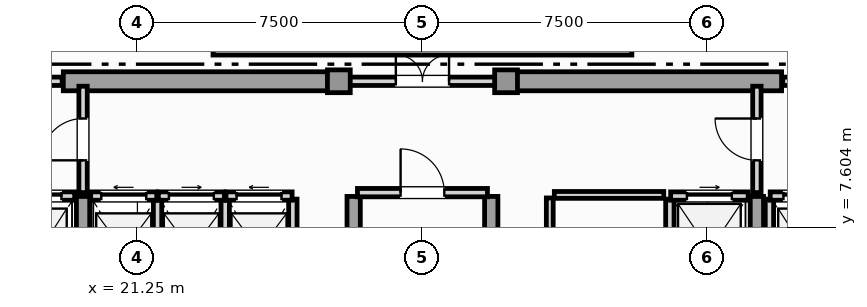
"""IFC4 building model, lengths in metres.
Left out: names, types, materials, properties, quantities, classifications, styles, units other than length and angle.
Written with IfcOpenShell. Run it as: python <this file> out.ifc"""

import sys

from ifc_helpers import new_model, si_unit, direction, frame, frame_2d, origin, origin_2d, place, context, subcontext, project, spatial, rectangle, extrude, element, fill, save


model = new_model("IFC4")
c1 = context("Model", 3, precision=1e-05, world=origin(), true_north=direction((0.0, 1.0)))
c2 = subcontext(c1, "Body", "Model", "MODEL_VIEW")
j1 = project(units=[si_unit("LENGTHUNIT", "METRE"), si_unit("PLANEANGLEUNIT", "RADIAN")], contexts=[c1])
p1 = place(None, origin())
s1 = spatial("IfcSite", under=j1, at=p1, CompositionType="ELEMENT")
p2 = place(p1, origin())
s2 = spatial("IfcBuilding", under=s1, at=p2, CompositionType="ELEMENT")
p3 = place(p2, frame((0.0, 0.0, 345.2)))
s3 = spatial("IfcBuildingStorey", under=s2, at=p3, CompositionType="ELEMENT", Elevation=345.2)
for number, where, z_axis, x_axis in (
    (1, (19.3, 11.45, 0.0), (0.0, 0.0, 1.0), (1.0, 0.0, 0.0)),
    (2, (30.9, 11.45, 0.0), (0.0, 0.0, 1.0), (1.0, 0.0, 0.0)),
):
    element("IfcWall", number, at=place(p3, frame(where, z_axis=z_axis, x_axis=x_axis)), inside=s3, PredefinedType="SHEAR", context=c2, shape_type="SweptSolid", body=[
        extrude(rectangle(XDim=7.3, YDim=0.5, at=frame_2d((3.65, 0.0))), origin(), (0.0, 0.0, 1.0), 3.59),
    ])
for number, where, z_axis, x_axis in (
    (3, (19.82, 0.92, 0.0), (0.0, 0.0, 1.0), (0.0, 1.0, 0.0)),
    (4, (26.94, 0.92, 0.0), (0.0, 0.0, 1.0), (0.0, 1.0, 0.0)),
    (5, (30.56, 0.92, 0.0), (0.0, 0.0, 1.0), (0.0, 1.0, 0.0)),
    (6, (37.55, 0.92, 0.0), (0.0, 0.0, 1.0), (0.0, 1.0, 0.0)),
):
    element("IfcWall", number, at=place(p3, frame(where, z_axis=z_axis, x_axis=x_axis)), inside=s3, PredefinedType="SHEAR", context=c2, shape_type="SweptSolid", body=[
        extrude(rectangle(XDim=7.5, YDim=0.35, at=frame_2d((3.75, 0.0))), origin(), (0.0, 0.0, 1.0), 3.59),
    ])
for number, where, z_axis, x_axis in (
    (7, (26.55, 11.45, 0.0), (0.0, 0.0, 1.0), (1.0, 0.0, 0.0)),
    (8, (30.95, 11.45, 0.0), (0.0, 0.0, 1.0), (1.0, 0.0, 0.0)),
):
    element("IfcColumn", number, at=place(p3, frame(where, z_axis=z_axis, x_axis=x_axis)), inside=s3, PredefinedType="COLUMN", context=c2, shape_type="SweptSolid", body=[
        extrude(rectangle(XDim=0.6, YDim=0.6, at=origin_2d()), origin(), (0.0, 0.0, 1.0), 3.85),
    ])
p4 = place(p3, frame((34.26, 12.27, 0.0), z_axis=(0.0, 0.0, 1.0), x_axis=(-1.0, 0.0, 0.0)))
e9 = element("IfcWall", 9, at=p4, inside=s3, PredefinedType="SOLIDWALL", context=c2, shape_type="SweptSolid", body=[
    extrude(rectangle(XDim=11.02, YDim=0.26, at=frame_2d((5.51, 0.0))), origin(), (0.0, 0.0, 1.0), 3.59),
])
p5 = place(p3, frame((17.78, 8.43, 0.0), z_axis=(0.0, 0.0, 1.0), x_axis=(1.0, 0.0, 0.0)))
e10 = element("IfcWall", 10, at=p5, inside=s3, PredefinedType="SOLIDWALL", context=c2, shape_type="SweptSolid", body=[
    extrude(rectangle(XDim=1.82, YDim=0.22, at=frame_2d((0.91, 0.0))), origin(), (0.0, 0.0, 1.0), 3.59),
])
p6 = place(p5, frame((0.35, 0.0, 0.0)))
e11 = element("IfcOpeningElement", 11, at=p6, cuts=e10, PredefinedType="OPENING", context=c2, shape_type="SweptSolid", body=[
    extrude(rectangle(XDim=1.12, YDim=2.25, at=frame_2d((0.56, 1.125))), frame((0.0, 0.12, 0.0), z_axis=(0.0, -1.0, 0.0), x_axis=(1.0, 0.0, 0.0)), (0.0, 0.0, 1.0), 0.24),
])
p7 = place(p3, frame((37.88, 5.65, 0.0), z_axis=(0.0, 0.0, 1.0), x_axis=(0.0, 1.0, 0.0)))
e12 = element("IfcWall", 12, at=p7, inside=s3, PredefinedType="SOLIDWALL", context=c2, shape_type="SweptSolid", body=[
    extrude(rectangle(XDim=2.7, YDim=0.22, at=frame_2d((1.35, 0.0))), origin(), (0.0, 0.0, 1.0), 3.59),
])
p8 = place(p3, frame((37.9, 8.43, 0.0), z_axis=(0.0, 0.0, 1.0), x_axis=(1.0, 0.0, 0.0)))
e13 = element("IfcWall", 13, at=p8, inside=s3, PredefinedType="SOLIDWALL", context=c2, shape_type="SweptSolid", body=[
    extrude(rectangle(XDim=1.82, YDim=0.22, at=frame_2d((0.91, 0.0))), origin(), (0.0, 0.0, 1.0), 3.59),
])
p9 = place(p8, frame((0.35, 0.0, 0.0)))
e14 = element("IfcOpeningElement", 14, at=p9, cuts=e13, PredefinedType="OPENING", context=c2, shape_type="SweptSolid", body=[
    extrude(rectangle(XDim=1.12, YDim=2.25, at=frame_2d((0.56, 1.125))), frame((0.0, 0.12, 0.0), z_axis=(0.0, -1.0, 0.0), x_axis=(1.0, 0.0, 0.0)), (0.0, 0.0, 1.0), 0.24),
])
p10 = place(p3, frame((35.26, 5.65, 0.0), z_axis=(0.0, 0.0, 1.0), x_axis=(0.0, 1.0, 0.0)))
e15 = element("IfcWall", 15, at=p10, inside=s3, PredefinedType="SOLIDWALL", context=c2, shape_type="SweptSolid", body=[
    extrude(rectangle(XDim=2.7, YDim=0.22, at=frame_2d((1.35, 0.0))), origin(), (0.0, 0.0, 1.0), 3.59),
])
p11 = place(p3, frame((35.28, 8.43, 0.0), z_axis=(0.0, 0.0, 1.0), x_axis=(1.0, 0.0, 0.0)))
e16 = element("IfcWall", 16, at=p11, inside=s3, PredefinedType="SOLIDWALL", context=c2, shape_type="SweptSolid", body=[
    extrude(rectangle(XDim=2.04, YDim=0.22, at=frame_2d((1.02, 0.0))), origin(), (0.0, 0.0, 1.0), 3.59),
])
p12 = place(p11, frame((0.43, 0.0, 0.0)))
e17 = element("IfcOpeningElement", 17, at=p12, cuts=e16, PredefinedType="OPENING", context=c2, shape_type="SweptSolid", body=[
    extrude(rectangle(XDim=1.18, YDim=2.2, at=frame_2d((0.59, 1.1))), frame((0.0, 0.12, 0.0), z_axis=(0.0, -1.0, 0.0), x_axis=(1.0, 0.0, 0.0)), (0.0, 0.0, 1.0), 0.24),
])
p13 = place(p3, frame((21.78, 5.65, 0.0), z_axis=(0.0, 0.0, 1.0), x_axis=(0.0, 1.0, 0.0)))
e18 = element("IfcWall", 18, at=p13, inside=s3, PredefinedType="SOLIDWALL", context=c2, shape_type="SweptSolid", body=[
    extrude(rectangle(XDim=2.7, YDim=0.22, at=frame_2d((1.35, 0.0))), origin(), (0.0, 0.0, 1.0), 3.59),
])
p14 = place(p3, frame((20.02, 8.43, 0.0), z_axis=(0.0, 0.0, 1.0), x_axis=(1.0, 0.0, 0.0)))
e19 = element("IfcWall", 19, at=p14, inside=s3, PredefinedType="SOLIDWALL", context=c2, shape_type="SweptSolid", body=[
    extrude(rectangle(XDim=1.74, YDim=0.22, at=frame_2d((0.87, 0.0))), origin(), (0.0, 0.0, 1.0), 3.59),
])
p15 = place(p14, frame((0.28, 0.0, 0.0)))
e20 = element("IfcOpeningElement", 20, at=p15, cuts=e19, PredefinedType="OPENING", context=c2, shape_type="SweptSolid", body=[
    extrude(rectangle(XDim=1.18, YDim=2.2, at=frame_2d((0.59, 1.1))), frame((0.0, 0.12, 0.0), z_axis=(0.0, -1.0, 0.0), x_axis=(1.0, 0.0, 0.0)), (0.0, 0.0, 1.0), 0.24),
])
p16 = place(p3, frame((23.56, 5.65, 0.0), z_axis=(0.0, 0.0, 1.0), x_axis=(0.0, 1.0, 0.0)))
e21 = element("IfcWall", 21, at=p16, inside=s3, PredefinedType="SOLIDWALL", context=c2, shape_type="SweptSolid", body=[
    extrude(rectangle(XDim=2.7, YDim=0.22, at=frame_2d((1.35, 0.0))), origin(), (0.0, 0.0, 1.0), 3.59),
])
p17 = place(p3, frame((21.8, 8.43, 0.0), z_axis=(0.0, 0.0, 1.0), x_axis=(1.0, 0.0, 0.0)))
e22 = element("IfcWall", 22, at=p17, inside=s3, PredefinedType="SOLIDWALL", context=c2, shape_type="SweptSolid", body=[
    extrude(rectangle(XDim=1.74, YDim=0.22, at=frame_2d((0.87, 0.0))), origin(), (0.0, 0.0, 1.0), 3.59),
])
p18 = place(p17, frame((0.28, 0.0, 0.0)))
e23 = element("IfcOpeningElement", 23, at=p18, cuts=e22, PredefinedType="OPENING", context=c2, shape_type="SweptSolid", body=[
    extrude(rectangle(XDim=1.18, YDim=2.2, at=frame_2d((0.59, 1.1))), frame((0.0, 0.12, 0.0), z_axis=(0.0, -1.0, 0.0), x_axis=(1.0, 0.0, 0.0)), (0.0, 0.0, 1.0), 0.24),
])
p19 = place(p3, frame((25.34, 5.65, 0.0), z_axis=(0.0, 0.0, 1.0), x_axis=(0.0, 1.0, 0.0)))
e24 = element("IfcWall", 24, at=p19, inside=s3, PredefinedType="SOLIDWALL", context=c2, shape_type="SweptSolid", body=[
    extrude(rectangle(XDim=2.7, YDim=0.22, at=frame_2d((1.35, 0.0))), origin(), (0.0, 0.0, 1.0), 3.59),
])
p20 = place(p3, frame((23.58, 8.43, 0.0), z_axis=(0.0, 0.0, 1.0), x_axis=(1.0, 0.0, 0.0)))
e25 = element("IfcWall", 25, at=p20, inside=s3, PredefinedType="SOLIDWALL", context=c2, shape_type="SweptSolid", body=[
    extrude(rectangle(XDim=1.74, YDim=0.22, at=frame_2d((0.87, 0.0))), origin(), (0.0, 0.0, 1.0), 3.59),
])
p21 = place(p20, frame((0.28, 0.0, 0.0)))
e26 = element("IfcOpeningElement", 26, at=p21, cuts=e25, PredefinedType="OPENING", context=c2, shape_type="SweptSolid", body=[
    extrude(rectangle(XDim=1.18, YDim=2.2, at=frame_2d((0.59, 1.1))), frame((0.0, 0.12, 0.0), z_axis=(0.0, -1.0, 0.0), x_axis=(1.0, 0.0, 0.0)), (0.0, 0.0, 1.0), 0.24),
])
p22 = place(p3, frame((27.04, 8.52, 0.0), z_axis=(0.0, 0.0, 1.0), x_axis=(1.0, 0.0, 0.0)))
e27 = element("IfcWall", 27, at=p22, inside=s3, PredefinedType="SOLIDWALL", context=c2, shape_type="SweptSolid", body=[
    extrude(rectangle(XDim=3.42, YDim=0.22, at=frame_2d((1.71, 0.0))), origin(), (0.0, 0.0, 1.0), 3.59),
])
p23 = place(p22, frame((1.135, 0.0, 0.0)))
e28 = element("IfcOpeningElement", 28, at=p23, cuts=e27, PredefinedType="OPENING", context=c2, shape_type="SweptSolid", body=[
    extrude(rectangle(XDim=1.15, YDim=2.2, at=frame_2d((0.575, 1.1))), frame((0.0, 0.12, 0.0), z_axis=(0.0, -1.0, 0.0), x_axis=(1.0, 0.0, 0.0)), (0.0, 0.0, 1.0), 0.24),
])
p24 = place(p3, frame((19.82, 8.52, 0.0), z_axis=(0.0, 0.0, 1.0), x_axis=(0.0, 1.0, 0.0)))
e29 = element("IfcWall", 29, at=p24, inside=s3, PredefinedType="SOLIDWALL", context=c2, shape_type="SweptSolid", body=[
    extrude(rectangle(XDim=2.8, YDim=0.22, at=frame_2d((1.4, 0.0))), origin(), (0.0, 0.0, 1.0), 3.046),
])
p25 = place(p24, frame((0.85, 0.0, 0.0)))
e30 = element("IfcOpeningElement", 30, at=p25, cuts=e29, PredefinedType="OPENING", context=c2, shape_type="SweptSolid", body=[
    extrude(rectangle(XDim=1.1, YDim=2.2, at=frame_2d((0.55, 1.1))), frame((0.0, 0.12, 0.0), z_axis=(0.0, -1.0, 0.0), x_axis=(1.0, 0.0, 0.0)), (0.0, 0.0, 1.0), 0.24),
])
p26 = place(p3, frame((37.55, 8.52, 0.0), z_axis=(0.0, 0.0, 1.0), x_axis=(0.0, 1.0, 0.0)))
e31 = element("IfcWall", 31, at=p26, inside=s3, PredefinedType="SOLIDWALL", context=c2, shape_type="SweptSolid", body=[
    extrude(rectangle(XDim=2.8, YDim=0.22, at=frame_2d((1.4, 0.0))), origin(), (0.0, 0.0, 1.0), 3.046),
])
p27 = place(p26, frame((0.85, 0.0, 0.0)))
e32 = element("IfcOpeningElement", 32, at=p27, cuts=e31, PredefinedType="OPENING", context=c2, shape_type="SweptSolid", body=[
    extrude(rectangle(XDim=1.1, YDim=2.2, at=frame_2d((0.55, 1.1))), frame((0.0, 0.12, 0.0), z_axis=(0.0, -1.0, 0.0), x_axis=(1.0, 0.0, 0.0)), (0.0, 0.0, 1.0), 0.24),
])
p28 = place(p3, frame((16.23, 11.45, 0.0), z_axis=(0.0, 0.0, 1.0), x_axis=(1.0, 0.0, 0.0)))
e33 = element("IfcWall", 33, at=p28, inside=s3, PredefinedType="SOLIDWALL", context=c2, shape_type="SweptSolid", body=[
    extrude(rectangle(XDim=3.04, YDim=0.22, at=frame_2d((1.52, 0.0))), origin(), (0.0, 0.0, 1.0), 3.59),
])
p29 = place(p28, frame((0.97, 0.0, 0.0)))
e34 = element("IfcOpeningElement", 34, at=p29, cuts=e33, PredefinedType="OPENING", context=c2, shape_type="SweptSolid", body=[
    extrude(rectangle(XDim=1.1, YDim=2.2, at=frame_2d((0.55, 1.1))), frame((0.0, 0.12, 0.0), z_axis=(0.0, -1.0, 0.0), x_axis=(1.0, 0.0, 0.0)), (0.0, 0.0, 1.0), 0.24),
])
p30 = place(p3, frame((26.63, 11.45, 0.0), z_axis=(0.0, 0.0, 1.0), x_axis=(1.0, 0.0, 0.0)))
e35 = element("IfcWall", 35, at=p30, inside=s3, PredefinedType="SOLIDWALL", context=c2, shape_type="SweptSolid", body=[
    extrude(rectangle(XDim=4.24, YDim=0.22, at=frame_2d((2.12, 0.0))), origin(), (0.0, 0.0, 1.0), 3.59),
])
p31 = place(p30, frame((1.42, 0.0, 0.0)))
e36 = element("IfcOpeningElement", 36, at=p31, cuts=e35, PredefinedType="OPENING", context=c2, shape_type="SweptSolid", body=[
    extrude(rectangle(XDim=1.4, YDim=2.2, at=frame_2d((0.7, 1.1))), frame((0.0, 0.12, 0.0), z_axis=(0.0, -1.0, 0.0), x_axis=(1.0, 0.0, 0.0)), (0.0, 0.0, 1.0), 0.24),
])
p32 = place(p3, frame((38.23, 11.45, 0.0), z_axis=(0.0, 0.0, 1.0), x_axis=(1.0, 0.0, 0.0)))
e37 = element("IfcWall", 37, at=p32, inside=s3, PredefinedType="SOLIDWALL", context=c2, shape_type="SweptSolid", body=[
    extrude(rectangle(XDim=3.04, YDim=0.22, at=frame_2d((1.52, 0.0))), origin(), (0.0, 0.0, 1.0), 3.59),
])
p33 = place(p32, frame((0.97, 0.0, 0.0)))
e38 = element("IfcOpeningElement", 38, at=p33, cuts=e37, PredefinedType="OPENING", context=c2, shape_type="SweptSolid", body=[
    extrude(rectangle(XDim=1.1, YDim=2.2, at=frame_2d((0.55, 1.1))), frame((0.0, 0.12, 0.0), z_axis=(0.0, -1.0, 0.0), x_axis=(1.0, 0.0, 0.0)), (0.0, 0.0, 1.0), 0.24),
])
p34 = place(p3, frame((32.1, 5.65, 0.0), z_axis=(0.0, 0.0, 1.0), x_axis=(0.0, 1.0, 0.0)))
e39 = element("IfcWall", 39, at=p34, inside=s3, PredefinedType="PARTITIONING", context=c2, shape_type="SweptSolid", body=[
    extrude(rectangle(XDim=2.73, YDim=0.18, at=frame_2d((1.365, 0.0))), origin(), (0.0, 0.0, 1.0), 3.59),
])
p35 = place(p34, frame((0.84, 0.0, 0.0)))
e40 = element("IfcOpeningElement", 40, at=p35, cuts=e39, PredefinedType="OPENING", context=c2, shape_type="SweptSolid", body=[
    extrude(rectangle(XDim=1.05, YDim=2.15, at=frame_2d((0.525, 1.075))), frame((0.0, 0.1, 0.0), z_axis=(0.0, -1.0, 0.0), x_axis=(1.0, 0.0, 0.0)), (0.0, 0.0, 1.0), 0.2),
])
p36 = place(p3, frame((32.22, 8.46, 0.0), z_axis=(0.0, 0.0, 1.0), x_axis=(1.0, 0.0, 0.0)))
e41 = element("IfcWall", 41, at=p36, inside=s3, PredefinedType="PARTITIONING", context=c2, shape_type="SweptSolid", body=[
    extrude(rectangle(XDim=2.88, YDim=0.18, at=frame_2d((1.44, 0.0))), origin(), (0.0, 0.0, 1.0), 3.59),
])
p37 = place(p6, origin())
e42 = element("IfcDoor", 42, at=p37, inside=s3, OperationType="SLIDING_TO_RIGHT", PredefinedType="DOOR", context=c2, shape_type="SweptSolid", body=[
    extrude(rectangle(XDim=1.12, YDim=2.25, at=frame_2d((0.56, 1.125))), frame((0.0, 0.025, 0.0), z_axis=(0.0, -1.0, 0.0), x_axis=(1.0, 0.0, 0.0)), (0.0, 0.0, 1.0), 0.05),
])
fill(e11, e42)
p38 = place(p9, origin())
e43 = element("IfcDoor", 43, at=p38, inside=s3, OperationType="SLIDING_TO_LEFT", PredefinedType="DOOR", context=c2, shape_type="SweptSolid", body=[
    extrude(rectangle(XDim=1.12, YDim=2.25, at=frame_2d((0.56, 1.125))), frame((0.0, 0.025, 0.0), z_axis=(0.0, -1.0, 0.0), x_axis=(1.0, 0.0, 0.0)), (0.0, 0.0, 1.0), 0.05),
])
fill(e14, e43)
p39 = place(p12, origin())
e44 = element("IfcDoor", 44, at=p39, inside=s3, OperationType="SLIDING_TO_RIGHT", PredefinedType="DOOR", context=c2, shape_type="SweptSolid", body=[
    extrude(rectangle(XDim=1.18, YDim=2.2, at=frame_2d((0.59, 1.1))), frame((0.0, 0.025, 0.0), z_axis=(0.0, -1.0, 0.0), x_axis=(1.0, 0.0, 0.0)), (0.0, 0.0, 1.0), 0.05),
])
fill(e17, e44)
p40 = place(p15, origin())
e45 = element("IfcDoor", 45, at=p40, inside=s3, OperationType="SLIDING_TO_LEFT", PredefinedType="DOOR", context=c2, shape_type="SweptSolid", body=[
    extrude(rectangle(XDim=1.18, YDim=2.2, at=frame_2d((0.59, 1.1))), frame((0.0, 0.025, 0.0), z_axis=(0.0, -1.0, 0.0), x_axis=(1.0, 0.0, 0.0)), (0.0, 0.0, 1.0), 0.05),
])
fill(e20, e45)
p41 = place(p18, origin())
e46 = element("IfcDoor", 46, at=p41, inside=s3, OperationType="SLIDING_TO_RIGHT", PredefinedType="DOOR", context=c2, shape_type="SweptSolid", body=[
    extrude(rectangle(XDim=1.18, YDim=2.2, at=frame_2d((0.59, 1.1))), frame((0.0, 0.025, 0.0), z_axis=(0.0, -1.0, 0.0), x_axis=(1.0, 0.0, 0.0)), (0.0, 0.0, 1.0), 0.05),
])
fill(e23, e46)
p42 = place(p21, origin())
e47 = element("IfcDoor", 47, at=p42, inside=s3, OperationType="SLIDING_TO_LEFT", PredefinedType="DOOR", context=c2, shape_type="SweptSolid", body=[
    extrude(rectangle(XDim=1.18, YDim=2.2, at=frame_2d((0.59, 1.1))), frame((0.0, 0.025, 0.0), z_axis=(0.0, -1.0, 0.0), x_axis=(1.0, 0.0, 0.0)), (0.0, 0.0, 1.0), 0.05),
])
fill(e26, e47)
p43 = place(p23, origin())
e48 = element("IfcDoor", 48, at=p43, inside=s3, OperationType="SINGLE_SWING_LEFT", PredefinedType="DOOR", context=c2, shape_type="SweptSolid", body=[
    extrude(rectangle(XDim=1.15, YDim=2.2, at=frame_2d((0.575, 1.1))), frame((0.0, 0.025, 0.0), z_axis=(0.0, -1.0, 0.0), x_axis=(1.0, 0.0, 0.0)), (0.0, 0.0, 1.0), 0.05),
])
fill(e28, e48)
p44 = place(p25, origin())
e49 = element("IfcDoor", 49, at=p44, inside=s3, OperationType="SINGLE_SWING_LEFT", PredefinedType="DOOR", context=c2, shape_type="SweptSolid", body=[
    extrude(rectangle(XDim=1.1, YDim=2.2, at=frame_2d((0.55, 1.1))), frame((0.0, 0.025, 0.0), z_axis=(0.0, -1.0, 0.0), x_axis=(1.0, 0.0, 0.0)), (0.0, 0.0, 1.0), 0.05),
])
fill(e30, e49)
p45 = place(p27, origin())
e50 = element("IfcDoor", 50, at=p45, inside=s3, OperationType="SINGLE_SWING_RIGHT", PredefinedType="DOOR", context=c2, shape_type="SweptSolid", body=[
    extrude(rectangle(XDim=1.1, YDim=2.2, at=frame_2d((0.55, 1.1))), frame((0.0, 0.025, 0.0), z_axis=(0.0, -1.0, 0.0), x_axis=(1.0, 0.0, 0.0)), (0.0, 0.0, 1.0), 0.05),
])
fill(e32, e50)
p46 = place(p31, origin())
e51 = element("IfcDoor", 51, at=p46, inside=s3, OperationType="DOUBLE_DOOR_SINGLE_SWING", PredefinedType="DOOR", context=c2, shape_type="SweptSolid", body=[
    extrude(rectangle(XDim=1.4, YDim=2.2, at=frame_2d((0.7, 1.1))), frame((0.0, 0.025, 0.0), z_axis=(0.0, -1.0, 0.0), x_axis=(1.0, 0.0, 0.0)), (0.0, 0.0, 1.0), 0.05),
])
fill(e36, e51)
save(model, sys.argv[1])
